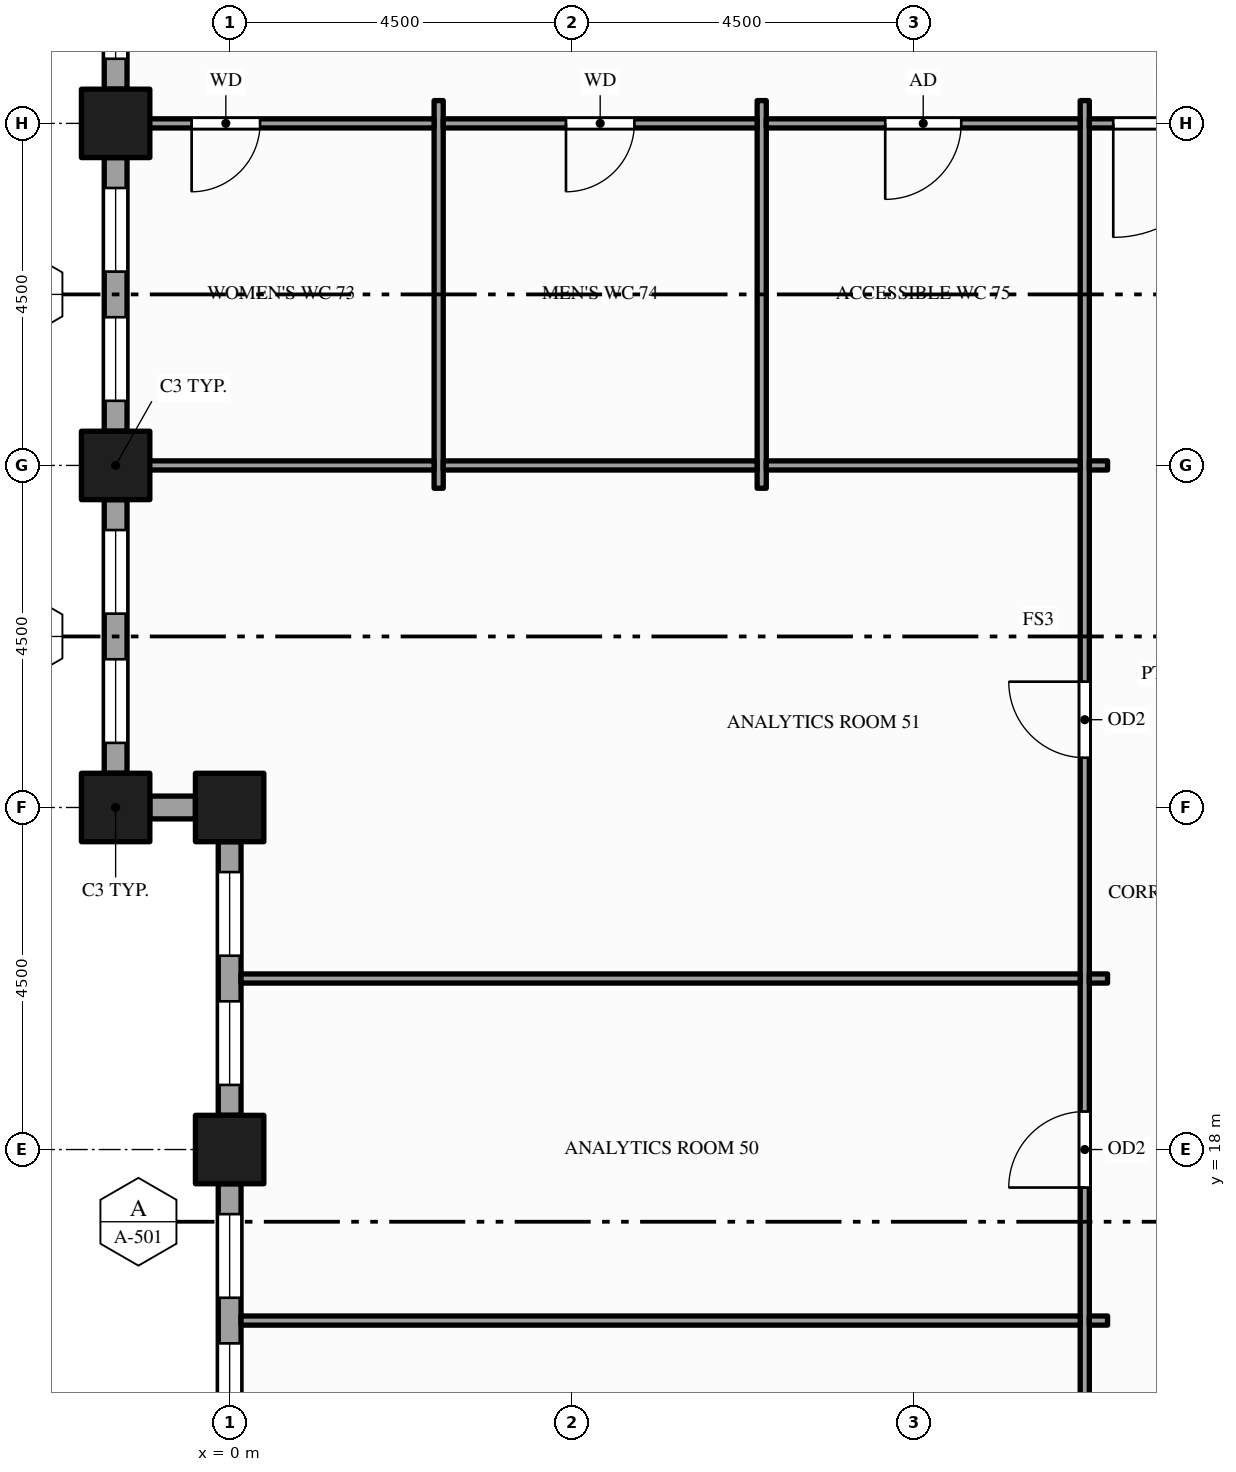
"""IFC4 building model, lengths in metres.
Left out: names, types, materials, properties, quantities, classifications, styles, units other than length and angle.
Written with IfcOpenShell. Run it as: python <this file> out.ifc"""

import sys

from ifc_helpers import new_model, si_unit, direction, frame, frame_2d, origin, origin_2d, place, context, subcontext, project, spatial, rectangle, hollow_rectangle, extrude, element, fill, save


model = new_model("IFC4")
c1 = context("Model", 3, precision=1e-05, world=origin(), true_north=direction((0.0, 1.0)))
c2 = subcontext(c1, "Body", "Model", "MODEL_VIEW")
j1 = project(units=[si_unit("LENGTHUNIT", "METRE"), si_unit("PLANEANGLEUNIT", "RADIAN")], contexts=[c1])
p1 = place(None, origin())
s1 = spatial("IfcSite", under=j1, at=p1, CompositionType="ELEMENT")
p2 = place(p1, origin())
s2 = spatial("IfcBuilding", under=s1, at=p2, CompositionType="ELEMENT")
p3 = place(p2, frame((0.0, 0.0, 179.0)))
s3 = spatial("IfcBuildingStorey", under=s2, at=p3, CompositionType="ELEMENT", Elevation=179.0)
for number, where, z_axis, x_axis in (
    (1, (-1.5, 22.5, -0.15), (0.0, 0.0, 1.0), (1.0, 0.0, 0.0)),
    (2, (-1.5, 27.0, -0.15), (0.0, 0.0, 1.0), (1.0, 0.0, 0.0)),
    (3, (-1.5, 31.5, -0.15), (0.0, 0.0, 1.0), (1.0, 0.0, 0.0)),
    (4, (0.0, 18.0, -0.15), (0.0, 0.0, 1.0), (1.0, 0.0, 0.0)),
    (5, (0.0, 22.5, -0.15), (0.0, 0.0, 1.0), (1.0, 0.0, 0.0)),
):
    element("IfcColumn", number, at=place(p3, frame(where, z_axis=z_axis, x_axis=x_axis)), inside=s3, PredefinedType="COLUMN", context=c2, shape_type="SweptSolid", body=[
        extrude(hollow_rectangle(XDim=0.9, YDim=0.9, WallThickness=0.045, at=origin_2d()), origin(), (0.0, 0.0, 1.0), 4.0),
    ])
p4 = place(p3, frame((-1.5, 35.55, 0.0), z_axis=(0.0, 0.0, 1.0), x_axis=(0.0, -1.0, 0.0)))
e6 = element("IfcWall", 6, at=p4, inside=s3, PredefinedType="STANDARD", context=c2, shape_type="SweptSolid", body=[
    extrude(rectangle(XDim=3.6, YDim=0.3, at=frame_2d((1.8, 0.0))), origin(), (0.0, 0.0, 1.0), 3.149),
])
p5 = place(p4, frame((0.4, 0.0, 0.9)))
e7 = element("IfcOpeningElement", 7, at=p5, cuts=e6, PredefinedType="OPENING", context=c2, shape_type="SweptSolid", body=[
    extrude(rectangle(XDim=1.1, YDim=2.0, at=frame_2d((0.55, 1.0))), frame((0.0, 0.16, 0.0), z_axis=(0.0, -1.0, 0.0), x_axis=(1.0, 0.0, 0.0)), (0.0, 0.0, 1.0), 0.32),
])
p6 = place(p4, frame((2.1, 0.0, 0.9)))
e8 = element("IfcOpeningElement", 8, at=p6, cuts=e6, PredefinedType="OPENING", context=c2, shape_type="SweptSolid", body=[
    extrude(rectangle(XDim=1.1, YDim=2.0, at=frame_2d((0.55, 1.0))), frame((0.0, 0.16, 0.0), z_axis=(0.0, -1.0, 0.0), x_axis=(1.0, 0.0, 0.0)), (0.0, 0.0, 1.0), 0.32),
])
p7 = place(p3, frame((-1.5, 31.05, 0.0), z_axis=(0.0, 0.0, 1.0), x_axis=(0.0, -1.0, 0.0)))
e9 = element("IfcWall", 9, at=p7, inside=s3, PredefinedType="STANDARD", context=c2, shape_type="SweptSolid", body=[
    extrude(rectangle(XDim=3.6, YDim=0.3, at=frame_2d((1.8, 0.0))), origin(), (0.0, 0.0, 1.0), 3.149),
])
p8 = place(p7, frame((0.4, 0.0, 0.9)))
e10 = element("IfcOpeningElement", 10, at=p8, cuts=e9, PredefinedType="OPENING", context=c2, shape_type="SweptSolid", body=[
    extrude(rectangle(XDim=1.1, YDim=2.0, at=frame_2d((0.55, 1.0))), frame((0.0, 0.16, 0.0), z_axis=(0.0, -1.0, 0.0), x_axis=(1.0, 0.0, 0.0)), (0.0, 0.0, 1.0), 0.32),
])
p9 = place(p7, frame((2.1, 0.0, 0.9)))
e11 = element("IfcOpeningElement", 11, at=p9, cuts=e9, PredefinedType="OPENING", context=c2, shape_type="SweptSolid", body=[
    extrude(rectangle(XDim=1.1, YDim=2.0, at=frame_2d((0.55, 1.0))), frame((0.0, 0.16, 0.0), z_axis=(0.0, -1.0, 0.0), x_axis=(1.0, 0.0, 0.0)), (0.0, 0.0, 1.0), 0.32),
])
p10 = place(p3, frame((-1.5, 26.55, 0.0), z_axis=(0.0, 0.0, 1.0), x_axis=(0.0, -1.0, 0.0)))
e12 = element("IfcWall", 12, at=p10, inside=s3, PredefinedType="STANDARD", context=c2, shape_type="SweptSolid", body=[
    extrude(rectangle(XDim=3.6, YDim=0.3, at=frame_2d((1.8, 0.0))), origin(), (0.0, 0.0, 1.0), 3.149),
])
p11 = place(p10, frame((0.4, 0.0, 0.9)))
e13 = element("IfcOpeningElement", 13, at=p11, cuts=e12, PredefinedType="OPENING", context=c2, shape_type="SweptSolid", body=[
    extrude(rectangle(XDim=1.1, YDim=2.0, at=frame_2d((0.55, 1.0))), frame((0.0, 0.16, 0.0), z_axis=(0.0, -1.0, 0.0), x_axis=(1.0, 0.0, 0.0)), (0.0, 0.0, 1.0), 0.32),
])
p12 = place(p10, frame((2.1, 0.0, 0.9)))
e14 = element("IfcOpeningElement", 14, at=p12, cuts=e12, PredefinedType="OPENING", context=c2, shape_type="SweptSolid", body=[
    extrude(rectangle(XDim=1.1, YDim=2.0, at=frame_2d((0.55, 1.0))), frame((0.0, 0.16, 0.0), z_axis=(0.0, -1.0, 0.0), x_axis=(1.0, 0.0, 0.0)), (0.0, 0.0, 1.0), 0.32),
])
p13 = place(p3, frame((-1.05, 22.5, 0.0), z_axis=(0.0, 0.0, 1.0), x_axis=(1.0, 0.0, 0.0)))
e15 = element("IfcWall", 15, at=p13, inside=s3, PredefinedType="STANDARD", context=c2, shape_type="SweptSolid", body=[
    extrude(rectangle(XDim=0.6, YDim=0.3, at=frame_2d((0.3, 0.0))), origin(), (0.0, 0.0, 1.0), 3.149),
])
p14 = place(p3, frame((0.0, 22.05, 0.0), z_axis=(0.0, 0.0, 1.0), x_axis=(0.0, -1.0, 0.0)))
e16 = element("IfcWall", 16, at=p14, inside=s3, PredefinedType="STANDARD", context=c2, shape_type="SweptSolid", body=[
    extrude(rectangle(XDim=3.6, YDim=0.3, at=frame_2d((1.8, 0.0))), origin(), (0.0, 0.0, 1.0), 3.149),
])
p15 = place(p14, frame((0.4, 0.0, 0.9)))
e17 = element("IfcOpeningElement", 17, at=p15, cuts=e16, PredefinedType="OPENING", context=c2, shape_type="SweptSolid", body=[
    extrude(rectangle(XDim=1.1, YDim=2.0, at=frame_2d((0.55, 1.0))), frame((0.0, 0.16, 0.0), z_axis=(0.0, -1.0, 0.0), x_axis=(1.0, 0.0, 0.0)), (0.0, 0.0, 1.0), 0.32),
])
p16 = place(p14, frame((2.1, 0.0, 0.9)))
e18 = element("IfcOpeningElement", 18, at=p16, cuts=e16, PredefinedType="OPENING", context=c2, shape_type="SweptSolid", body=[
    extrude(rectangle(XDim=1.1, YDim=2.0, at=frame_2d((0.55, 1.0))), frame((0.0, 0.16, 0.0), z_axis=(0.0, -1.0, 0.0), x_axis=(1.0, 0.0, 0.0)), (0.0, 0.0, 1.0), 0.32),
])
p17 = place(p3, frame((0.0, 17.55, 0.0), z_axis=(0.0, 0.0, 1.0), x_axis=(0.0, -1.0, 0.0)))
e19 = element("IfcWall", 19, at=p17, inside=s3, PredefinedType="STANDARD", context=c2, shape_type="SweptSolid", body=[
    extrude(rectangle(XDim=3.6, YDim=0.3, at=frame_2d((1.8, 0.0))), origin(), (0.0, 0.0, 1.0), 3.149),
])
p18 = place(p17, frame((0.4, 0.0, 0.9)))
e20 = element("IfcOpeningElement", 20, at=p18, cuts=e19, PredefinedType="OPENING", context=c2, shape_type="SweptSolid", body=[
    extrude(rectangle(XDim=1.1, YDim=2.0, at=frame_2d((0.55, 1.0))), frame((0.0, 0.16, 0.0), z_axis=(0.0, -1.0, 0.0), x_axis=(1.0, 0.0, 0.0)), (0.0, 0.0, 1.0), 0.32),
])
p19 = place(p17, frame((2.1, 0.0, 0.9)))
e21 = element("IfcOpeningElement", 21, at=p19, cuts=e19, PredefinedType="OPENING", context=c2, shape_type="SweptSolid", body=[
    extrude(rectangle(XDim=1.1, YDim=2.0, at=frame_2d((0.55, 1.0))), frame((0.0, 0.16, 0.0), z_axis=(0.0, -1.0, 0.0), x_axis=(1.0, 0.0, 0.0)), (0.0, 0.0, 1.0), 0.32),
])
for number, where, z_axis, x_axis in (
    (22, (2.75, 26.7, 0.0), (0.0, 0.0, 1.0), (0.0, 1.0, 0.0)),
    (23, (7.0, 26.7, 0.0), (0.0, 0.0, 1.0), (0.0, 1.0, 0.0)),
):
    element("IfcWall", number, at=place(p3, frame(where, z_axis=z_axis, x_axis=x_axis)), inside=s3, PredefinedType="PARTITIONING", context=c2, shape_type="SweptSolid", body=[
        extrude(rectangle(XDim=5.1, YDim=0.12, at=frame_2d((2.55, 0.0))), origin(), (0.0, 0.0, 1.0), 3.85),
    ])
p20 = place(p3, frame((11.25, 10.95, 0.0), z_axis=(0.0, 0.0, 1.0), x_axis=(0.0, 1.0, 0.0)))
e24 = element("IfcWall", 24, at=p20, inside=s3, PredefinedType="PARTITIONING", context=c2, shape_type="SweptSolid", body=[
    extrude(rectangle(XDim=20.85, YDim=0.12, at=frame_2d((10.425, 0.0))), origin(), (0.0, 0.0, 1.0), 2.6),
])
p21 = place(p20, frame((2.05, 0.0, 0.0)))
e25 = element("IfcOpeningElement", 25, at=p21, cuts=e24, PredefinedType="OPENING", context=c2, shape_type="SweptSolid", body=[
    extrude(rectangle(XDim=1.0, YDim=2.1, at=frame_2d((0.5, 1.05))), frame((0.0, 0.07, 0.0), z_axis=(0.0, -1.0, 0.0), x_axis=(1.0, 0.0, 0.0)), (0.0, 0.0, 1.0), 0.14),
])
p22 = place(p20, frame((6.55, 0.0, 0.0)))
e26 = element("IfcOpeningElement", 26, at=p22, cuts=e24, PredefinedType="OPENING", context=c2, shape_type="SweptSolid", body=[
    extrude(rectangle(XDim=1.0, YDim=2.1, at=frame_2d((0.5, 1.05))), frame((0.0, 0.07, 0.0), z_axis=(0.0, -1.0, 0.0), x_axis=(1.0, 0.0, 0.0)), (0.0, 0.0, 1.0), 0.14),
])
p23 = place(p20, frame((12.205, 0.0, 0.0)))
e27 = element("IfcOpeningElement", 27, at=p23, cuts=e24, PredefinedType="OPENING", context=c2, shape_type="SweptSolid", body=[
    extrude(rectangle(XDim=1.0, YDim=2.1, at=frame_2d((0.5, 1.05))), frame((0.0, 0.07, 0.0), z_axis=(0.0, -1.0, 0.0), x_axis=(1.0, 0.0, 0.0)), (0.0, 0.0, 1.0), 0.14),
])
p24 = place(p3, frame((0.15, 15.75, 0.0), z_axis=(0.0, 0.0, 1.0), x_axis=(1.0, 0.0, 0.0)))
e28 = element("IfcWall", 28, at=p24, inside=s3, PredefinedType="PARTITIONING", context=c2, shape_type="SweptSolid", body=[
    extrude(rectangle(XDim=11.04, YDim=0.12, at=frame_2d((5.52, 0.0))), origin(), (0.0, 0.0, 1.0), 2.87),
])
p25 = place(p3, frame((11.31, 15.75, 0.0), z_axis=(0.0, 0.0, 1.0), x_axis=(1.0, 0.0, 0.0)))
e29 = element("IfcWall", 29, at=p25, inside=s3, PredefinedType="PARTITIONING", context=c2, shape_type="SweptSolid", body=[
    extrude(rectangle(XDim=0.24, YDim=0.12, at=frame_2d((0.12, 0.0))), origin(), (0.0, 0.0, 1.0), 2.87),
])
p26 = place(p3, frame((0.15, 20.25, 0.0), z_axis=(0.0, 0.0, 1.0), x_axis=(1.0, 0.0, 0.0)))
e30 = element("IfcWall", 30, at=p26, inside=s3, PredefinedType="PARTITIONING", context=c2, shape_type="SweptSolid", body=[
    extrude(rectangle(XDim=11.04, YDim=0.12, at=frame_2d((5.52, 0.0))), origin(), (0.0, 0.0, 1.0), 2.87),
])
p27 = place(p3, frame((11.31, 20.25, 0.0), z_axis=(0.0, 0.0, 1.0), x_axis=(1.0, 0.0, 0.0)))
e31 = element("IfcWall", 31, at=p27, inside=s3, PredefinedType="PARTITIONING", context=c2, shape_type="SweptSolid", body=[
    extrude(rectangle(XDim=0.24, YDim=0.12, at=frame_2d((0.12, 0.0))), origin(), (0.0, 0.0, 1.0), 2.87),
])
p28 = place(p3, frame((-1.35, 27.0, 0.0), z_axis=(0.0, 0.0, 1.0), x_axis=(1.0, 0.0, 0.0)))
e32 = element("IfcWall", 32, at=p28, inside=s3, PredefinedType="PARTITIONING", context=c2, shape_type="SweptSolid", body=[
    extrude(rectangle(XDim=4.04, YDim=0.12, at=frame_2d((2.02, 0.0))), origin(), (0.0, 0.0, 1.0), 2.87),
])
for number, where, z_axis, x_axis in (
    (33, (2.81, 27.0, 0.0), (0.0, 0.0, 1.0), (1.0, 0.0, 0.0)),
    (34, (7.06, 27.0, 0.0), (0.0, 0.0, 1.0), (1.0, 0.0, 0.0)),
):
    element("IfcWall", number, at=place(p3, frame(where, z_axis=z_axis, x_axis=x_axis)), inside=s3, PredefinedType="PARTITIONING", context=c2, shape_type="SweptSolid", body=[
        extrude(rectangle(XDim=4.13, YDim=0.12, at=frame_2d((2.065, 0.0))), origin(), (0.0, 0.0, 1.0), 2.87),
    ])
p29 = place(p3, frame((11.31, 27.0, 0.0), z_axis=(0.0, 0.0, 1.0), x_axis=(1.0, 0.0, 0.0)))
e35 = element("IfcWall", 35, at=p29, inside=s3, PredefinedType="PARTITIONING", context=c2, shape_type="SweptSolid", body=[
    extrude(rectangle(XDim=0.24, YDim=0.12, at=frame_2d((0.12, 0.0))), origin(), (0.0, 0.0, 1.0), 2.87),
])
p30 = place(p3, frame((-1.35, 31.5, 0.0), z_axis=(0.0, 0.0, 1.0), x_axis=(1.0, 0.0, 0.0)))
e36 = element("IfcWall", 36, at=p30, inside=s3, PredefinedType="PARTITIONING", context=c2, shape_type="SweptSolid", body=[
    extrude(rectangle(XDim=4.04, YDim=0.12, at=frame_2d((2.02, 0.0))), origin(), (0.0, 0.0, 1.0), 2.87),
])
p31 = place(p30, frame((0.85, 0.0, 0.0)))
e37 = element("IfcOpeningElement", 37, at=p31, cuts=e36, PredefinedType="OPENING", context=c2, shape_type="SweptSolid", body=[
    extrude(rectangle(XDim=0.9, YDim=2.1, at=frame_2d((0.45, 1.05))), frame((0.0, 0.07, 0.0), z_axis=(0.0, -1.0, 0.0), x_axis=(1.0, 0.0, 0.0)), (0.0, 0.0, 1.0), 0.14),
])
p32 = place(p3, frame((2.81, 31.5, 0.0), z_axis=(0.0, 0.0, 1.0), x_axis=(1.0, 0.0, 0.0)))
e38 = element("IfcWall", 38, at=p32, inside=s3, PredefinedType="PARTITIONING", context=c2, shape_type="SweptSolid", body=[
    extrude(rectangle(XDim=4.13, YDim=0.12, at=frame_2d((2.065, 0.0))), origin(), (0.0, 0.0, 1.0), 2.87),
])
p33 = place(p32, frame((1.615, 0.0, 0.0)))
e39 = element("IfcOpeningElement", 39, at=p33, cuts=e38, PredefinedType="OPENING", context=c2, shape_type="SweptSolid", body=[
    extrude(rectangle(XDim=0.9, YDim=2.1, at=frame_2d((0.45, 1.05))), frame((0.0, 0.07, 0.0), z_axis=(0.0, -1.0, 0.0), x_axis=(1.0, 0.0, 0.0)), (0.0, 0.0, 1.0), 0.14),
])
p34 = place(p3, frame((7.06, 31.5, 0.0), z_axis=(0.0, 0.0, 1.0), x_axis=(1.0, 0.0, 0.0)))
e40 = element("IfcWall", 40, at=p34, inside=s3, PredefinedType="PARTITIONING", context=c2, shape_type="SweptSolid", body=[
    extrude(rectangle(XDim=4.13, YDim=0.12, at=frame_2d((2.065, 0.0))), origin(), (0.0, 0.0, 1.0), 2.87),
])
p35 = place(p34, frame((1.565, 0.0, 0.0)))
e41 = element("IfcOpeningElement", 41, at=p35, cuts=e40, PredefinedType="OPENING", context=c2, shape_type="SweptSolid", body=[
    extrude(rectangle(XDim=1.0, YDim=2.1, at=frame_2d((0.5, 1.05))), frame((0.0, 0.07, 0.0), z_axis=(0.0, -1.0, 0.0), x_axis=(1.0, 0.0, 0.0)), (0.0, 0.0, 1.0), 0.14),
])
p36 = place(p3, frame((11.31, 31.5, 0.0), z_axis=(0.0, 0.0, 1.0), x_axis=(1.0, 0.0, 0.0)))
e42 = element("IfcWall", 42, at=p36, inside=s3, PredefinedType="PARTITIONING", context=c2, shape_type="SweptSolid", body=[
    extrude(rectangle(XDim=2.13, YDim=0.12, at=frame_2d((1.065, 0.0))), origin(), (0.0, 0.0, 1.0), 2.87),
])
p37 = place(p36, frame((0.315, 0.0, 0.0)))
e43 = element("IfcOpeningElement", 43, at=p37, cuts=e42, PredefinedType="OPENING", context=c2, shape_type="SweptSolid", body=[
    extrude(rectangle(XDim=1.5, YDim=2.1, at=frame_2d((0.75, 1.05))), frame((0.0, 0.07, 0.0), z_axis=(0.0, -1.0, 0.0), x_axis=(1.0, 0.0, 0.0)), (0.0, 0.0, 1.0), 0.14),
])
p38 = place(p6, origin())
e44 = element("IfcWindow", 44, at=p38, inside=s3, PartitioningType="SINGLE_PANEL", PredefinedType="WINDOW", context=c2, shape_type="SweptSolid", body=[
    extrude(rectangle(XDim=1.1, YDim=2.0, at=frame_2d((0.55, 1.0))), frame((0.0, 0.03, 0.0), z_axis=(0.0, -1.0, 0.0), x_axis=(1.0, 0.0, 0.0)), (0.0, 0.0, 1.0), 0.06),
])
fill(e8, e44)
p39 = place(p8, origin())
e45 = element("IfcWindow", 45, at=p39, inside=s3, PartitioningType="SINGLE_PANEL", PredefinedType="WINDOW", context=c2, shape_type="SweptSolid", body=[
    extrude(rectangle(XDim=1.1, YDim=2.0, at=frame_2d((0.55, 1.0))), frame((0.0, 0.03, 0.0), z_axis=(0.0, -1.0, 0.0), x_axis=(1.0, 0.0, 0.0)), (0.0, 0.0, 1.0), 0.06),
])
fill(e10, e45)
p40 = place(p9, origin())
e46 = element("IfcWindow", 46, at=p40, inside=s3, PartitioningType="SINGLE_PANEL", PredefinedType="WINDOW", context=c2, shape_type="SweptSolid", body=[
    extrude(rectangle(XDim=1.1, YDim=2.0, at=frame_2d((0.55, 1.0))), frame((0.0, 0.03, 0.0), z_axis=(0.0, -1.0, 0.0), x_axis=(1.0, 0.0, 0.0)), (0.0, 0.0, 1.0), 0.06),
])
fill(e11, e46)
p41 = place(p11, origin())
e47 = element("IfcWindow", 47, at=p41, inside=s3, PartitioningType="SINGLE_PANEL", PredefinedType="WINDOW", context=c2, shape_type="SweptSolid", body=[
    extrude(rectangle(XDim=1.1, YDim=2.0, at=frame_2d((0.55, 1.0))), frame((0.0, 0.03, 0.0), z_axis=(0.0, -1.0, 0.0), x_axis=(1.0, 0.0, 0.0)), (0.0, 0.0, 1.0), 0.06),
])
fill(e13, e47)
p42 = place(p12, origin())
e48 = element("IfcWindow", 48, at=p42, inside=s3, PartitioningType="SINGLE_PANEL", PredefinedType="WINDOW", context=c2, shape_type="SweptSolid", body=[
    extrude(rectangle(XDim=1.1, YDim=2.0, at=frame_2d((0.55, 1.0))), frame((0.0, 0.03, 0.0), z_axis=(0.0, -1.0, 0.0), x_axis=(1.0, 0.0, 0.0)), (0.0, 0.0, 1.0), 0.06),
])
fill(e14, e48)
p43 = place(p15, origin())
e49 = element("IfcWindow", 49, at=p43, inside=s3, PartitioningType="SINGLE_PANEL", PredefinedType="WINDOW", context=c2, shape_type="SweptSolid", body=[
    extrude(rectangle(XDim=1.1, YDim=2.0, at=frame_2d((0.55, 1.0))), frame((0.0, 0.03, 0.0), z_axis=(0.0, -1.0, 0.0), x_axis=(1.0, 0.0, 0.0)), (0.0, 0.0, 1.0), 0.06),
])
fill(e17, e49)
p44 = place(p16, origin())
e50 = element("IfcWindow", 50, at=p44, inside=s3, PartitioningType="SINGLE_PANEL", PredefinedType="WINDOW", context=c2, shape_type="SweptSolid", body=[
    extrude(rectangle(XDim=1.1, YDim=2.0, at=frame_2d((0.55, 1.0))), frame((0.0, 0.03, 0.0), z_axis=(0.0, -1.0, 0.0), x_axis=(1.0, 0.0, 0.0)), (0.0, 0.0, 1.0), 0.06),
])
fill(e18, e50)
p45 = place(p18, origin())
e51 = element("IfcWindow", 51, at=p45, inside=s3, PartitioningType="SINGLE_PANEL", PredefinedType="WINDOW", context=c2, shape_type="SweptSolid", body=[
    extrude(rectangle(XDim=1.1, YDim=2.0, at=frame_2d((0.55, 1.0))), frame((0.0, 0.03, 0.0), z_axis=(0.0, -1.0, 0.0), x_axis=(1.0, 0.0, 0.0)), (0.0, 0.0, 1.0), 0.06),
])
fill(e20, e51)
p46 = place(p19, origin())
e52 = element("IfcWindow", 52, at=p46, inside=s3, PartitioningType="SINGLE_PANEL", PredefinedType="WINDOW", context=c2, shape_type="SweptSolid", body=[
    extrude(rectangle(XDim=1.1, YDim=2.0, at=frame_2d((0.55, 1.0))), frame((0.0, 0.03, 0.0), z_axis=(0.0, -1.0, 0.0), x_axis=(1.0, 0.0, 0.0)), (0.0, 0.0, 1.0), 0.06),
])
fill(e21, e52)
p47 = place(p37, origin())
e53 = element("IfcDoor", 53, at=p47, inside=s3, OperationType="SINGLE_SWING_LEFT", PredefinedType="DOOR", context=c2, shape_type="SweptSolid", body=[
    extrude(rectangle(XDim=1.5, YDim=2.1, at=frame_2d((0.75, 1.05))), frame((0.0, 0.025, 0.0), z_axis=(0.0, -1.0, 0.0), x_axis=(1.0, 0.0, 0.0)), (0.0, 0.0, 1.0), 0.05),
])
fill(e43, e53)
p48 = place(p22, origin())
e54 = element("IfcDoor", 54, at=p48, inside=s3, OperationType="SINGLE_SWING_LEFT", PredefinedType="DOOR", context=c2, shape_type="SweptSolid", body=[
    extrude(rectangle(XDim=1.0, YDim=2.1, at=frame_2d((0.5, 1.05))), frame((0.0, 0.025, 0.0), z_axis=(0.0, -1.0, 0.0), x_axis=(1.0, 0.0, 0.0)), (0.0, 0.0, 1.0), 0.05),
])
fill(e26, e54)
p49 = place(p23, origin())
e55 = element("IfcDoor", 55, at=p49, inside=s3, OperationType="SINGLE_SWING_RIGHT", PredefinedType="DOOR", context=c2, shape_type="SweptSolid", body=[
    extrude(rectangle(XDim=1.0, YDim=2.1, at=frame_2d((0.5, 1.05))), frame((0.0, 0.025, 0.0), z_axis=(0.0, -1.0, 0.0), x_axis=(1.0, 0.0, 0.0)), (0.0, 0.0, 1.0), 0.05),
])
fill(e27, e55)
p50 = place(p31, origin())
e56 = element("IfcDoor", 56, at=p50, inside=s3, OperationType="SINGLE_SWING_LEFT", PredefinedType="DOOR", context=c2, shape_type="SweptSolid", body=[
    extrude(rectangle(XDim=0.9, YDim=2.1, at=frame_2d((0.45, 1.05))), frame((0.0, 0.025, 0.0), z_axis=(0.0, -1.0, 0.0), x_axis=(1.0, 0.0, 0.0)), (0.0, 0.0, 1.0), 0.05),
])
fill(e37, e56)
p51 = place(p33, origin())
e57 = element("IfcDoor", 57, at=p51, inside=s3, OperationType="SINGLE_SWING_LEFT", PredefinedType="DOOR", context=c2, shape_type="SweptSolid", body=[
    extrude(rectangle(XDim=0.9, YDim=2.1, at=frame_2d((0.45, 1.05))), frame((0.0, 0.025, 0.0), z_axis=(0.0, -1.0, 0.0), x_axis=(1.0, 0.0, 0.0)), (0.0, 0.0, 1.0), 0.05),
])
fill(e39, e57)
p52 = place(p35, origin())
e58 = element("IfcDoor", 58, at=p52, inside=s3, OperationType="SINGLE_SWING_LEFT", PredefinedType="DOOR", context=c2, shape_type="SweptSolid", body=[
    extrude(rectangle(XDim=1.0, YDim=2.1, at=frame_2d((0.5, 1.05))), frame((0.0, 0.025, 0.0), z_axis=(0.0, -1.0, 0.0), x_axis=(1.0, 0.0, 0.0)), (0.0, 0.0, 1.0), 0.05),
])
fill(e41, e58)
save(model, sys.argv[1])
